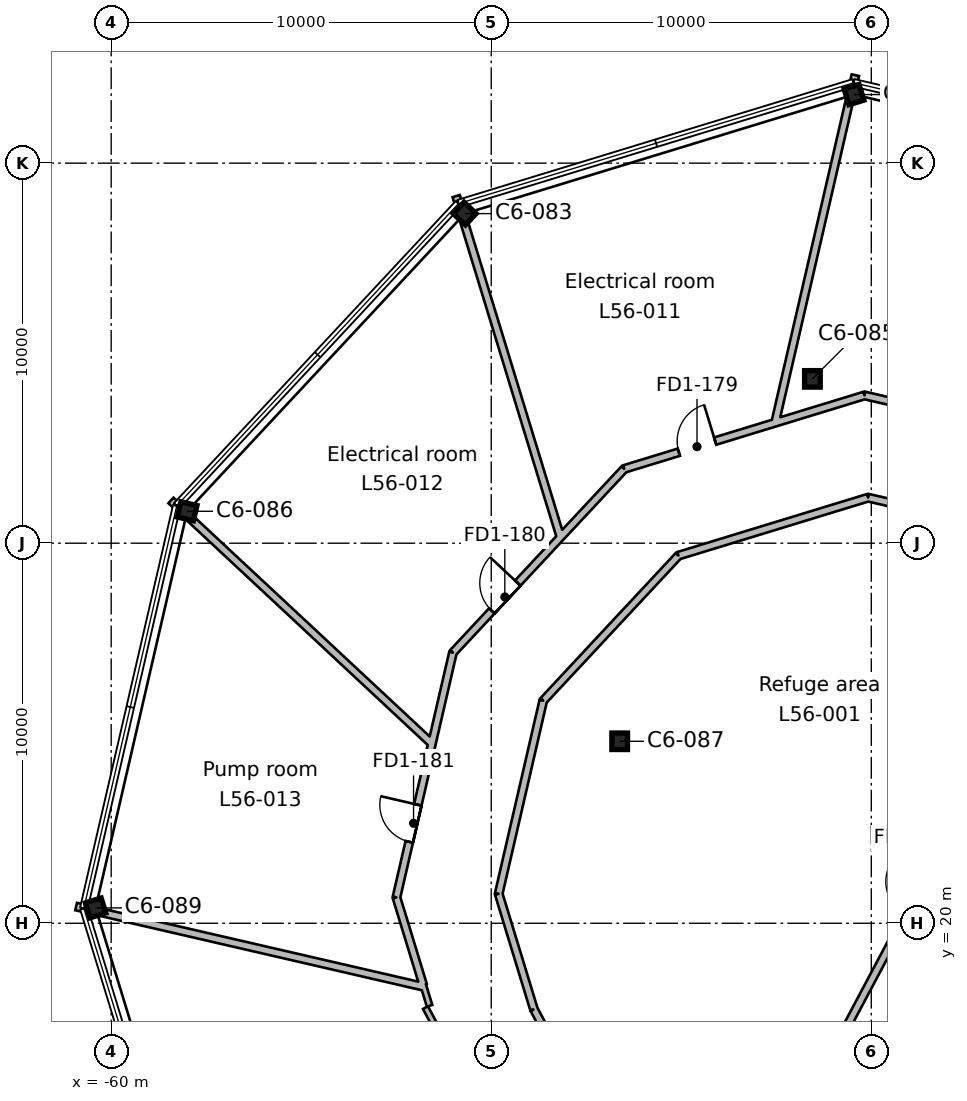
"""IFC4 building model, lengths in metres.
Left out: names, types, materials, properties, quantities, classifications, styles, units other than length and angle.
Written with IfcOpenShell. Run it as: python <this file> out.ifc"""

import sys

from ifc_helpers import new_model, si_unit, direction, frame, frame_2d, origin, origin_2d, place, context, subcontext, project, spatial, rectangle, i_section, extrude, element, fill, save


model = new_model("IFC4")
c1 = context("Model", 3, precision=1e-05, world=origin(), true_north=direction((0.0, 1.0)))
c2 = subcontext(c1, "Body", "Model", "MODEL_VIEW")
j1 = project(units=[si_unit("LENGTHUNIT", "METRE"), si_unit("PLANEANGLEUNIT", "RADIAN")], contexts=[c1])
p1 = place(None, origin())
s1 = spatial("IfcSite", under=j1, at=p1, CompositionType="ELEMENT")
p2 = place(p1, origin())
s2 = spatial("IfcBuilding", under=s1, at=p2, CompositionType="ELEMENT")
p3 = place(p2, frame((0.0, 0.0, 252.0)))
s3 = spatial("IfcBuildingStorey", under=s2, at=p3, CompositionType="ELEMENT", Elevation=252.0)
for number, where, z_axis, x_axis in (
    (1, (-60.41, 20.404, 0.0), (0.0, 0.0, 1.0), (0.292, -0.956, 0.0)),
    (2, (-46.62, 24.788, 0.0), (0.0, 0.0, 1.0), (1.0, 0.0, 0.0)),
    (3, (-58.001, 30.84, 0.0), (0.0, 0.0, 1.0), (-0.225, -0.974, 0.0)),
    (4, (-41.549, 34.324, 0.0), (0.0, 0.0, 1.0), (1.0, 0.0, 0.0)),
    (5, (-50.697, 38.672, 0.0), (0.0, 0.0, 1.0), (-0.682, -0.731, 0.0)),
    (6, (-40.455, 41.804, 0.0), (0.0, 0.0, 1.0), (-0.956, -0.292, 0.0)),
):
    element("IfcColumn", number, at=place(p3, frame(where, z_axis=z_axis, x_axis=x_axis)), inside=s3, PredefinedType="COLUMN", context=c2, shape_type="SweptSolid", body=[
        extrude(i_section(OverallWidth=0.412, OverallDepth=0.434, WebThickness=0.036, FlangeThickness=0.057, FilletRadius=0.015, at=origin_2d()), origin(), (0.0, 0.0, 1.0), 6.0),
    ])
p4 = place(p3, frame((-32.0, 28.001, 0.0), z_axis=(0.0, 0.0, 1.0), x_axis=(-0.469468958625, -0.882948977511, 0.0)))
e7 = element("IfcWall", 7, at=p4, inside=s3, PredefinedType="SHEAR", context=c2, shape_type="SweptSolid", body=[
    extrude(rectangle(XDim=19.4, YDim=0.6, at=frame_2d((9.7, 0.0))), origin(), (0.0, 0.0, 1.0), 6.0),
])
p5 = place(p4, frame((10.3, 0.0, 0.0)))
e8 = element("IfcOpeningElement", 8, at=p5, cuts=e7, PredefinedType="OPENING", context=c2, shape_type="SweptSolid", body=[
    extrude(rectangle(XDim=2.4, YDim=2.4, at=frame_2d((1.2, 1.2))), frame((0.0, 0.31, 0.0), z_axis=(0.0, -1.0, 0.0), x_axis=(1.0, 0.0, 0.0)), (0.0, 0.0, 1.0), 0.62),
])
p6 = place(p3, frame((-51.775, 18.328, 0.0), z_axis=(0.0, 0.0, 1.0), x_axis=(-0.974364013848, 0.224977262225, 0.0)))
e9 = element("IfcWall", 9, at=p6, inside=s3, PredefinedType="PARTITIONING", context=c2, shape_type="SweptSolid", body=[
    extrude(rectangle(XDim=9.388, YDim=0.2, at=frame_2d((4.694, 0.0))), origin(), (0.0, 0.0, 1.0), 5.55),
])
p7 = place(p3, frame((-58.427, 31.125, 0.0), z_axis=(0.0, 0.0, 1.0), x_axis=(0.731446083693, -0.681899278963, 0.0)))
e10 = element("IfcWall", 10, at=p7, inside=s3, PredefinedType="PARTITIONING", context=c2, shape_type="SweptSolid", body=[
    extrude(rectangle(XDim=9.387, YDim=0.2, at=frame_2d((4.693, 0.0))), origin(), (0.0, 0.0, 1.0), 5.55),
])
p8 = place(p3, frame((-51.548, 24.779, 0.0), z_axis=(0.0, 0.0, 1.0), x_axis=(-0.224876464395, -0.974387282225, 0.0)))
e11 = element("IfcWall", 11, at=p8, inside=s3, PredefinedType="PARTITIONING", context=c2, shape_type="SweptSolid", body=[
    extrude(rectangle(XDim=4.206, YDim=0.2, at=frame_2d((2.103, 0.0))), origin(), (0.0, 0.0, 1.0), 5.55),
])
p9 = place(p8, frame((1.705, 0.0, 0.0)))
e12 = element("IfcOpeningElement", 12, at=p9, cuts=e11, PredefinedType="OPENING", context=c2, shape_type="SweptSolid", body=[
    extrude(rectangle(XDim=1.0, YDim=2.1, at=frame_2d((0.5, 1.05))), frame((0.0, 0.11, 0.0), z_axis=(0.0, -1.0, 0.0), x_axis=(1.0, 0.0, 0.0)), (0.0, 0.0, 1.0), 0.22),
])
p10 = place(p3, frame((-52.494, 20.681, 0.0), z_axis=(0.0, 0.0, 1.0), x_axis=(0.292022408241, -0.956411476868, 0.0)))
e13 = element("IfcWall", 13, at=p10, inside=s3, PredefinedType="PARTITIONING", context=c2, shape_type="SweptSolid", body=[
    extrude(rectangle(XDim=2.404, YDim=0.2, at=frame_2d((1.202, 0.0))), origin(), (0.0, 0.0, 1.0), 5.55),
])
p11 = place(p3, frame((-51.442, 17.239, 0.0), z_axis=(0.0, 0.0, 1.0), x_axis=(-0.470009270926, 0.882661478282, 0.0)))
e14 = element("IfcWall", 14, at=p11, inside=s3, PredefinedType="PARTITIONING", context=c2, shape_type="SweptSolid", body=[
    extrude(rectangle(XDim=0.613, YDim=0.15, at=frame_2d((0.307, 0.0))), origin(), (0.0, 0.0, 1.0), 5.55),
])
p12 = place(p3, frame((-51.623, 17.828, 0.0), z_axis=(0.0, 0.0, 1.0), x_axis=(-0.292368373338, 0.956305774463, 0.0)))
e15 = element("IfcWall", 15, at=p12, inside=s3, PredefinedType="PARTITIONING", context=c2, shape_type="SweptSolid", body=[
    extrude(rectangle(XDim=0.58, YDim=0.15, at=frame_2d((0.29, 0.0))), origin(), (0.0, 0.0, 1.0), 5.55),
])
p13 = place(p3, frame((-48.139, 30.198, 0.0), z_axis=(0.0, 0.0, 1.0), x_axis=(-0.681859031146, -0.731483603127, 0.0)))
e16 = element("IfcWall", 16, at=p13, inside=s3, PredefinedType="PARTITIONING", context=c2, shape_type="SweptSolid", body=[
    extrude(rectangle(XDim=4.206, YDim=0.2, at=frame_2d((2.103, 0.0))), origin(), (0.0, 0.0, 1.0), 5.55),
])
p14 = place(p13, frame((1.705, 0.0, 0.0)))
e17 = element("IfcOpeningElement", 17, at=p14, cuts=e16, PredefinedType="OPENING", context=c2, shape_type="SweptSolid", body=[
    extrude(rectangle(XDim=1.0, YDim=2.1, at=frame_2d((0.5, 1.05))), frame((0.0, 0.11, 0.0), z_axis=(0.0, -1.0, 0.0), x_axis=(1.0, 0.0, 0.0)), (0.0, 0.0, 1.0), 0.22),
])
p15 = place(p3, frame((-51.007, 27.121, 0.0), z_axis=(0.0, 0.0, 1.0), x_axis=(-0.225074619895, -0.974341529177, 0.0)))
e18 = element("IfcWall", 18, at=p15, inside=s3, PredefinedType="PARTITIONING", context=c2, shape_type="SweptSolid", body=[
    extrude(rectangle(XDim=2.404, YDim=0.2, at=frame_2d((1.202, 0.0))), origin(), (0.0, 0.0, 1.0), 5.55),
])
p16 = place(p3, frame((-50.922, 39.133, 0.0), z_axis=(0.0, 0.0, 1.0), x_axis=(0.292425999744, -0.956288154624, 0.0)))
e19 = element("IfcWall", 19, at=p16, inside=s3, PredefinedType="PARTITIONING", context=c2, shape_type="SweptSolid", body=[
    extrude(rectangle(XDim=9.387, YDim=0.2, at=frame_2d((4.694, 0.0))), origin(), (0.0, 0.0, 1.0), 5.55),
])
p17 = place(p3, frame((-42.5, 33.178, 0.0), z_axis=(0.0, 0.0, 1.0), x_axis=(-0.956286285355, -0.292432112536, 0.0)))
e20 = element("IfcWall", 20, at=p17, inside=s3, PredefinedType="PARTITIONING", context=c2, shape_type="SweptSolid", body=[
    extrude(rectangle(XDim=4.182, YDim=0.2, at=frame_2d((2.091, 0.0))), origin(), (0.0, 0.0, 1.0), 5.55),
])
p18 = place(p17, frame((1.681, 0.0, 0.0)))
e21 = element("IfcOpeningElement", 21, at=p18, cuts=e20, PredefinedType="OPENING", context=c2, shape_type="SweptSolid", body=[
    extrude(rectangle(XDim=1.0, YDim=2.1, at=frame_2d((0.5, 1.05))), frame((0.0, 0.11, 0.0), z_axis=(0.0, -1.0, 0.0), x_axis=(1.0, 0.0, 0.0)), (0.0, 0.0, 1.0), 0.22),
])
p19 = place(p3, frame((-46.499, 31.955, 0.0), z_axis=(0.0, 0.0, 1.0), x_axis=(-0.682307392652, -0.731065401953, 0.0)))
e22 = element("IfcWall", 22, at=p19, inside=s3, PredefinedType="PARTITIONING", context=c2, shape_type="SweptSolid", body=[
    extrude(rectangle(XDim=2.404, YDim=0.2, at=frame_2d((1.202, 0.0))), origin(), (0.0, 0.0, 1.0), 5.55),
])
p20 = place(p3, frame((-47.637, 15.409, 0.0), z_axis=(0.0, 0.0, 1.0), x_axis=(-0.469694336193, 0.882829106084, 0.0)))
e23 = element("IfcWall", 23, at=p20, inside=s3, PredefinedType="PARTITIONING", context=c2, shape_type="SweptSolid", body=[
    extrude(rectangle(XDim=2.637, YDim=0.2, at=frame_2d((1.319, 0.0))), origin(), (0.0, 0.0, 1.0), 5.55),
])
p21 = place(p3, frame((-48.876, 17.737, 0.0), z_axis=(0.0, 0.0, 1.0), x_axis=(-0.292146284928, 0.956373644661, 0.0)))
e24 = element("IfcWall", 24, at=p21, inside=s3, PredefinedType="PARTITIONING", context=c2, shape_type="SweptSolid", body=[
    extrude(rectangle(XDim=3.177, YDim=0.2, at=frame_2d((1.588, 0.0))), origin(), (0.0, 0.0, 1.0), 5.55),
])
p22 = place(p3, frame((-49.804, 20.775, 0.0), z_axis=(0.0, 0.0, 1.0), x_axis=(0.224873181383, 0.974388039897, 0.0)))
e25 = element("IfcWall", 25, at=p22, inside=s3, PredefinedType="PARTITIONING", context=c2, shape_type="SweptSolid", body=[
    extrude(rectangle(XDim=5.216, YDim=0.2, at=frame_2d((2.608, 0.0))), origin(), (0.0, 0.0, 1.0), 5.55),
])
p23 = place(p3, frame((-48.631, 25.857, 0.0), z_axis=(0.0, 0.0, 1.0), x_axis=(0.681944715531, 0.731403722277, 0.0)))
e26 = element("IfcWall", 26, at=p23, inside=s3, PredefinedType="PARTITIONING", context=c2, shape_type="SweptSolid", body=[
    extrude(rectangle(XDim=5.218, YDim=0.2, at=frame_2d((2.609, 0.0))), origin(), (0.0, 0.0, 1.0), 5.55),
])
p24 = place(p3, frame((-45.073, 29.673, 0.0), z_axis=(0.0, 0.0, 1.0), x_axis=(0.9563257737, 0.292302949965, 0.0)))
e27 = element("IfcWall", 27, at=p24, inside=s3, PredefinedType="PARTITIONING", context=c2, shape_type="SweptSolid", body=[
    extrude(rectangle(XDim=5.217, YDim=0.2, at=frame_2d((2.608, 0.0))), origin(), (0.0, 0.0, 1.0), 5.55),
])
p25 = place(p3, frame((-40.084, 31.198, 0.0), z_axis=(0.0, 0.0, 1.0), x_axis=(0.974378029488, -0.22491655264, 0.0)))
e28 = element("IfcWall", 28, at=p25, inside=s3, PredefinedType="PARTITIONING", context=c2, shape_type="SweptSolid", body=[
    extrude(rectangle(XDim=6.251, YDim=0.2, at=frame_2d((3.125, 0.0))), origin(), (0.0, 0.0, 1.0), 5.55),
])
p26 = place(p3, frame((-33.993, 29.792, 0.0), z_axis=(0.0, 0.0, 1.0), x_axis=(-0.469462883155, -0.882952207846, 0.0)))
e29 = element("IfcWall", 29, at=p26, inside=s3, PredefinedType="PARTITIONING", context=c2, shape_type="SweptSolid", body=[
    extrude(rectangle(XDim=20.692, YDim=0.2, at=frame_2d((10.346, 0.0))), origin(), (0.0, 0.0, 1.0), 5.55),
])
p27 = place(p26, frame((9.85, 0.0, 0.0)))
e30 = element("IfcOpeningElement", 30, at=p27, cuts=e29, PredefinedType="OPENING", context=c2, shape_type="SweptSolid", body=[
    extrude(rectangle(XDim=1.0, YDim=2.1, at=frame_2d((0.5, 1.05))), frame((0.0, 0.11, 0.0), z_axis=(0.0, -1.0, 0.0), x_axis=(1.0, 0.0, 0.0)), (0.0, 0.0, 1.0), 0.22),
])
p28 = place(p3, frame((-40.419, 42.315, 0.0), z_axis=(0.0, 0.0, 1.0), x_axis=(-0.225005769503, -0.974357431177, 0.0)))
e31 = element("IfcWall", 31, at=p28, inside=s3, PredefinedType="PARTITIONING", context=c2, shape_type="SweptSolid", body=[
    extrude(rectangle(XDim=9.387, YDim=0.2, at=frame_2d((4.693, 0.0))), origin(), (0.0, 0.0, 1.0), 5.55),
])
p29 = place(p3, frame((-34.912, 32.672, 0.0), z_axis=(0.0, 0.0, 1.0), x_axis=(-0.974366064539, 0.224968380611, 0.0)))
e32 = element("IfcWall", 32, at=p29, inside=s3, PredefinedType="PARTITIONING", context=c2, shape_type="SweptSolid", body=[
    extrude(rectangle(XDim=5.404, YDim=0.2, at=frame_2d((2.702, 0.0))), origin(), (0.0, 0.0, 1.0), 5.55),
])
p30 = place(p29, frame((2.25, 0.0, 0.0)))
e33 = element("IfcOpeningElement", 33, at=p30, cuts=e32, PredefinedType="OPENING", context=c2, shape_type="SweptSolid", body=[
    extrude(rectangle(XDim=1.0, YDim=2.1, at=frame_2d((0.5, 1.05))), frame((0.0, 0.11, 0.0), z_axis=(0.0, -1.0, 0.0), x_axis=(1.0, 0.0, 0.0)), (0.0, 0.0, 1.0), 0.22),
])
p31 = place(p3, frame((-40.178, 33.888, 0.0), z_axis=(0.0, 0.0, 1.0), x_axis=(-0.956299260122, -0.292389680205, 0.0)))
e34 = element("IfcWall", 34, at=p31, inside=s3, PredefinedType="PARTITIONING", context=c2, shape_type="SweptSolid", body=[
    extrude(rectangle(XDim=2.428, YDim=0.2, at=frame_2d((1.214, 0.0))), origin(), (0.0, 0.0, 1.0), 5.55),
])
p32 = place(p18, frame((1.0, 0.0, 0.0), z_axis=(0.0, 0.0, 1.0), x_axis=(-1.0, 0.0, 0.0)))
e35 = element("IfcDoor", 35, at=p32, inside=s3, OperationType="SINGLE_SWING_RIGHT", PredefinedType="DOOR", context=c2, shape_type="SweptSolid", body=[
    extrude(rectangle(XDim=1.0, YDim=2.1, at=frame_2d((0.5, 1.05))), frame((0.0, 0.025, 0.0), z_axis=(0.0, -1.0, 0.0), x_axis=(1.0, 0.0, 0.0)), (0.0, 0.0, 1.0), 0.05),
])
fill(e21, e35)
p33 = place(p14, frame((1.0, 0.0, 0.0), z_axis=(0.0, 0.0, 1.0), x_axis=(-1.0, 0.0, 0.0)))
e36 = element("IfcDoor", 36, at=p33, inside=s3, OperationType="SINGLE_SWING_RIGHT", PredefinedType="DOOR", context=c2, shape_type="SweptSolid", body=[
    extrude(rectangle(XDim=1.0, YDim=2.1, at=frame_2d((0.5, 1.05))), frame((0.0, 0.025, 0.0), z_axis=(0.0, -1.0, 0.0), x_axis=(1.0, 0.0, 0.0)), (0.0, 0.0, 1.0), 0.05),
])
fill(e17, e36)
p34 = place(p9, frame((1.0, 0.0, 0.0), z_axis=(0.0, 0.0, 1.0), x_axis=(-1.0, 0.0, 0.0)))
e37 = element("IfcDoor", 37, at=p34, inside=s3, OperationType="SINGLE_SWING_RIGHT", PredefinedType="DOOR", context=c2, shape_type="SweptSolid", body=[
    extrude(rectangle(XDim=1.0, YDim=2.1, at=frame_2d((0.5, 1.05))), frame((0.0, 0.025, 0.0), z_axis=(0.0, -1.0, 0.0), x_axis=(1.0, 0.0, 0.0)), (0.0, 0.0, 1.0), 0.05),
])
fill(e12, e37)
save(model, sys.argv[1])
